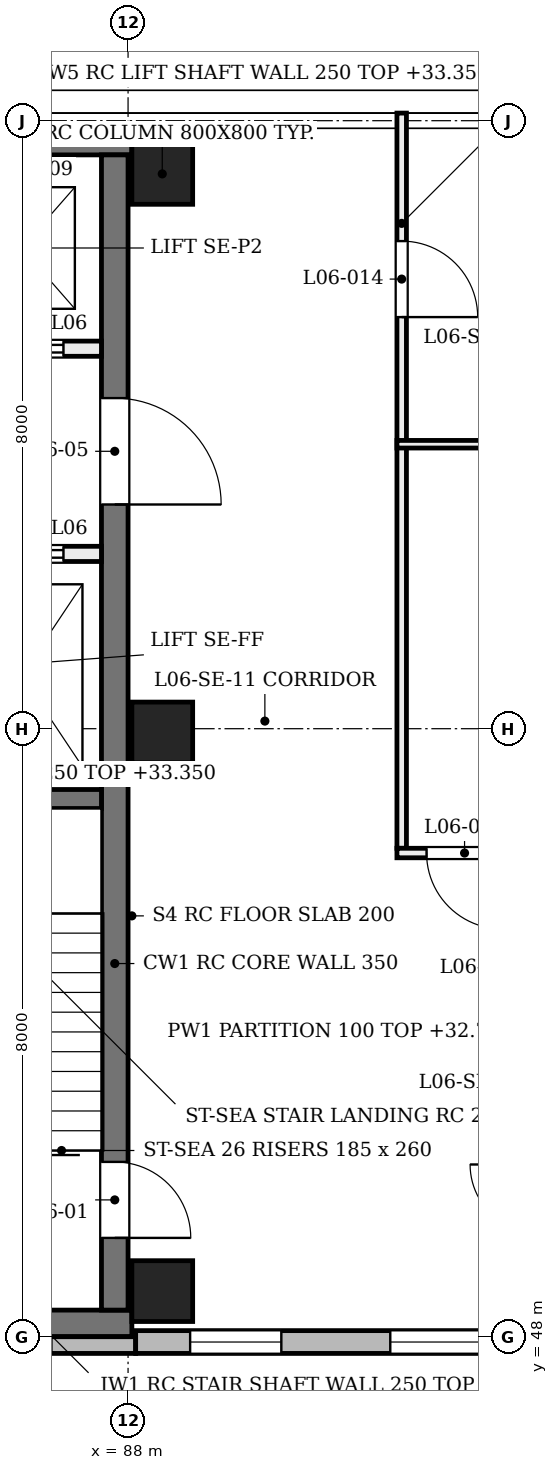
"""IFC4 building model, lengths in metres.
Left out: names, types, materials, properties, quantities, classifications, styles, units other than length and angle.
Written with IfcOpenShell. Run it as: python <this file> out.ifc"""

import sys

from ifc_helpers import new_model, si_unit, direction, frame, frame_2d, origin, origin_2d, place, context, subcontext, project, spatial, rectangle, extrude, element, fill, save


model = new_model("IFC4")
c1 = context("Model", 3, precision=1e-05, world=origin(), true_north=direction((0.0, 1.0)))
c2 = subcontext(c1, "Body", "Model", "MODEL_VIEW")
j1 = project(units=[si_unit("LENGTHUNIT", "METRE"), si_unit("PLANEANGLEUNIT", "RADIAN")], contexts=[c1])
p1 = place(None, origin())
s1 = spatial("IfcSite", under=j1, at=p1, CompositionType="ELEMENT")
p2 = place(p1, origin())
s2 = spatial("IfcBuilding", under=s1, at=p2, CompositionType="ELEMENT")
p3 = place(p2, frame((0.0, 0.0, 28.8)))
s3 = spatial("IfcBuildingStorey", under=s2, at=p3, CompositionType="ELEMENT", Elevation=28.8)
for number, where, z_axis, x_axis in (
    (1, (80.1, 48.175, 0.0), (0.0, 0.0, 1.0), (1.0, 0.0, 0.0)),
    (2, (80.1, 63.725, 0.0), (0.0, 0.0, 1.0), (1.0, 0.0, 0.0)),
):
    element("IfcWall", number, at=place(p3, frame(where, z_axis=z_axis, x_axis=x_axis)), inside=s3, PredefinedType="SHEAR", context=c2, shape_type="SweptSolid", body=[
        extrude(rectangle(XDim=7.95, YDim=0.35, at=frame_2d((3.975, 0.0))), origin(), (0.0, 0.0, 1.0), 4.58),
    ])
p4 = place(p3, frame((87.825, 48.35, 0.0), z_axis=(0.0, 0.0, 1.0), x_axis=(0.0, 1.0, 0.0)))
e3 = element("IfcWall", 3, at=p4, inside=s3, PredefinedType="SHEAR", context=c2, shape_type="SweptSolid", body=[
    extrude(rectangle(XDim=15.2, YDim=0.35, at=frame_2d((7.6, 0.0))), origin(), (0.0, 0.0, 1.0), 4.58),
])
p5 = place(p4, frame((0.95, 0.0, 0.0)))
e4 = element("IfcOpeningElement", 4, at=p5, cuts=e3, PredefinedType="OPENING", context=c2, shape_type="SweptSolid", body=[
    extrude(rectangle(XDim=1.0, YDim=2.1, at=frame_2d((0.5, 1.05))), frame((0.0, 0.185, 0.0), z_axis=(0.0, -1.0, 0.0), x_axis=(1.0, 0.0, 0.0)), (0.0, 0.0, 1.0), 0.37),
])
p6 = place(p4, frame((10.6, 0.0, 0.0)))
e5 = element("IfcOpeningElement", 5, at=p6, cuts=e3, PredefinedType="OPENING", context=c2, shape_type="SweptSolid", body=[
    extrude(rectangle(XDim=1.4, YDim=2.1, at=frame_2d((0.7, 1.05))), frame((0.0, 0.185, 0.0), z_axis=(0.0, -1.0, 0.0), x_axis=(1.0, 0.0, 0.0)), (0.0, 0.0, 1.0), 0.37),
])
for number, where, z_axis, x_axis in (
    (6, (88.45, 48.6, 0.0), (0.0, 0.0, 1.0), (1.0, 0.0, 0.0)),
    (7, (88.45, 55.95, 0.0), (0.0, 0.0, 1.0), (1.0, 0.0, 0.0)),
    (8, (88.45, 63.3, 0.0), (0.0, 0.0, 1.0), (1.0, 0.0, 0.0)),
):
    element("IfcColumn", number, at=place(p3, frame(where, z_axis=z_axis, x_axis=x_axis)), inside=s3, PredefinedType="COLUMN", context=c2, shape_type="SweptSolid", body=[
        extrude(rectangle(XDim=0.8, YDim=0.8, at=origin_2d()), origin(), (0.0, 0.0, 1.0), 4.58),
    ])
p7 = place(p3, frame((79.9, 47.89, 0.0), z_axis=(0.0, 0.0, 1.0), x_axis=(1.0, 0.0, 0.0)))
e9 = element("IfcWall", 9, at=p7, inside=s3, PredefinedType="SOLIDWALL", context=c2, shape_type="SweptSolid", body=[
    extrude(rectangle(XDim=8.2, YDim=0.22, at=frame_2d((4.1, 0.0))), origin(), (0.0, 0.0, 1.0), 3.9),
])
p8 = place(p7, frame((1.308, 0.0, 0.9)))
e10 = element("IfcOpeningElement", 10, at=p8, cuts=e9, PredefinedType="OPENING", context=c2, shape_type="SweptSolid", body=[
    extrude(rectangle(XDim=0.45, YDim=2.6, at=frame_2d((0.225, 1.3))), frame((0.0, 0.12, 0.0), z_axis=(0.0, -1.0, 0.0), x_axis=(1.0, 0.0, 0.0)), (0.0, 0.0, 1.0), 0.24),
])
p9 = place(p7, frame((3.975, 0.0, 0.9)))
e11 = element("IfcOpeningElement", 11, at=p9, cuts=e9, PredefinedType="OPENING", context=c2, shape_type="SweptSolid", body=[
    extrude(rectangle(XDim=0.45, YDim=2.6, at=frame_2d((0.225, 1.3))), frame((0.0, 0.12, 0.0), z_axis=(0.0, -1.0, 0.0), x_axis=(1.0, 0.0, 0.0)), (0.0, 0.0, 1.0), 0.24),
])
p10 = place(p7, frame((6.642, 0.0, 0.9)))
e12 = element("IfcOpeningElement", 12, at=p10, cuts=e9, PredefinedType="OPENING", context=c2, shape_type="SweptSolid", body=[
    extrude(rectangle(XDim=0.45, YDim=2.6, at=frame_2d((0.225, 1.3))), frame((0.0, 0.12, 0.0), z_axis=(0.0, -1.0, 0.0), x_axis=(1.0, 0.0, 0.0)), (0.0, 0.0, 1.0), 0.24),
])
p11 = place(p3, frame((88.1, 47.93, 0.0), z_axis=(0.0, 0.0, 1.0), x_axis=(1.0, 0.0, 0.0)))
e13 = element("IfcWall", 13, at=p11, inside=s3, PredefinedType="SOLIDWALL", context=c2, shape_type="SweptSolid", body=[
    extrude(rectangle(XDim=7.9, YDim=0.3, at=frame_2d((3.95, 0.0))), origin(), (0.0, 0.0, 1.0), 3.9),
])
p12 = place(p11, frame((0.717, 0.0, 1.0)))
e14 = element("IfcOpeningElement", 14, at=p12, cuts=e13, PredefinedType="OPENING", context=c2, shape_type="SweptSolid", body=[
    extrude(rectangle(XDim=1.2, YDim=2.4, at=frame_2d((0.6, 1.2))), frame((0.0, 0.16, 0.0), z_axis=(0.0, -1.0, 0.0), x_axis=(1.0, 0.0, 0.0)), (0.0, 0.0, 1.0), 0.32),
])
p13 = place(p11, frame((3.35, 0.0, 1.0)))
e15 = element("IfcOpeningElement", 15, at=p13, cuts=e13, PredefinedType="OPENING", context=c2, shape_type="SweptSolid", body=[
    extrude(rectangle(XDim=1.2, YDim=2.4, at=frame_2d((0.6, 1.2))), frame((0.0, 0.16, 0.0), z_axis=(0.0, -1.0, 0.0), x_axis=(1.0, 0.0, 0.0)), (0.0, 0.0, 1.0), 0.32),
])
p14 = place(p11, frame((5.983, 0.0, 1.0)))
e16 = element("IfcOpeningElement", 16, at=p14, cuts=e13, PredefinedType="OPENING", context=c2, shape_type="SweptSolid", body=[
    extrude(rectangle(XDim=1.2, YDim=2.4, at=frame_2d((0.6, 1.2))), frame((0.0, 0.16, 0.0), z_axis=(0.0, -1.0, 0.0), x_axis=(1.0, 0.0, 0.0)), (0.0, 0.0, 1.0), 0.32),
])
p15 = place(p3, frame((85.3, 64.25, 0.0), z_axis=(0.0, 0.0, 1.0), x_axis=(1.0, 0.0, 0.0)))
e17 = element("IfcWall", 17, at=p15, inside=s3, PredefinedType="PARAPET", context=c2, shape_type="SweptSolid", body=[
    extrude(rectangle(XDim=15.4, YDim=0.3, at=frame_2d((7.7, 0.0))), origin(), (0.0, 0.0, 1.0), 1.1),
])
p16 = place(p3, frame((87.65, 55.075, 0.0), z_axis=(0.0, 0.0, 1.0), x_axis=(-1.0, 0.0, 0.0)))
e18 = element("IfcWall", 18, at=p16, inside=s3, PredefinedType="SOLIDWALL", context=c2, shape_type="SweptSolid", body=[
    extrude(rectangle(XDim=3.1, YDim=0.25, at=frame_2d((1.55, 0.0))), origin(), (0.0, 0.0, 1.0), 4.55),
])
p17 = place(p3, frame((87.65, 58.3, 0.0), z_axis=(0.0, 0.0, 1.0), x_axis=(-1.0, 0.0, 0.0)))
e19 = element("IfcWall", 19, at=p17, inside=s3, PredefinedType="SOLIDWALL", context=c2, shape_type="SweptSolid", body=[
    extrude(rectangle(XDim=7.2, YDim=0.2, at=frame_2d((3.6, 0.0))), origin(), (0.0, 0.0, 1.0), 4.55),
])
p18 = place(p17, frame((0.5, 0.0, 0.0)))
e20 = element("IfcOpeningElement", 20, at=p18, cuts=e19, PredefinedType="OPENING", context=c2, shape_type="SweptSolid", body=[
    extrude(rectangle(XDim=1.1, YDim=2.1, at=frame_2d((0.55, 1.05))), frame((0.0, 0.11, 0.0), z_axis=(0.0, -1.0, 0.0), x_axis=(1.0, 0.0, 0.0)), (0.0, 0.0, 1.0), 0.22),
])
p19 = place(p17, frame((5.6, 0.0, 0.0)))
e21 = element("IfcOpeningElement", 21, at=p19, cuts=e19, PredefinedType="OPENING", context=c2, shape_type="SweptSolid", body=[
    extrude(rectangle(XDim=1.1, YDim=2.1, at=frame_2d((0.55, 1.05))), frame((0.0, 0.11, 0.0), z_axis=(0.0, -1.0, 0.0), x_axis=(1.0, 0.0, 0.0)), (0.0, 0.0, 1.0), 0.22),
])
p20 = place(p17, frame((3.1, 0.0, 0.0)))
e22 = element("IfcOpeningElement", 22, at=p20, cuts=e19, PredefinedType="OPENING", context=c2, shape_type="SweptSolid", body=[
    extrude(rectangle(XDim=1.0, YDim=2.1, at=frame_2d((0.5, 1.05))), frame((0.0, 0.11, 0.0), z_axis=(0.0, -1.0, 0.0), x_axis=(1.0, 0.0, 0.0)), (0.0, 0.0, 1.0), 0.22),
])
p21 = place(p3, frame((87.65, 61.0, 0.0), z_axis=(0.0, 0.0, 1.0), x_axis=(-1.0, 0.0, 0.0)))
e23 = element("IfcWall", 23, at=p21, inside=s3, PredefinedType="SOLIDWALL", context=c2, shape_type="SweptSolid", body=[
    extrude(rectangle(XDim=7.2, YDim=0.2, at=frame_2d((3.6, 0.0))), origin(), (0.0, 0.0, 1.0), 4.55),
])
p22 = place(p21, frame((0.5, 0.0, 0.0)))
e24 = element("IfcOpeningElement", 24, at=p22, cuts=e23, PredefinedType="OPENING", context=c2, shape_type="SweptSolid", body=[
    extrude(rectangle(XDim=1.1, YDim=2.1, at=frame_2d((0.55, 1.05))), frame((0.0, 0.11, 0.0), z_axis=(0.0, -1.0, 0.0), x_axis=(1.0, 0.0, 0.0)), (0.0, 0.0, 1.0), 0.22),
])
p23 = place(p21, frame((5.6, 0.0, 0.0)))
e25 = element("IfcOpeningElement", 25, at=p23, cuts=e23, PredefinedType="OPENING", context=c2, shape_type="SweptSolid", body=[
    extrude(rectangle(XDim=1.1, YDim=2.1, at=frame_2d((0.55, 1.05))), frame((0.0, 0.11, 0.0), z_axis=(0.0, -1.0, 0.0), x_axis=(1.0, 0.0, 0.0)), (0.0, 0.0, 1.0), 0.22),
])
p24 = place(p21, frame((3.1, 0.0, 0.0)))
e26 = element("IfcOpeningElement", 26, at=p24, cuts=e23, PredefinedType="OPENING", context=c2, shape_type="SweptSolid", body=[
    extrude(rectangle(XDim=1.0, YDim=2.1, at=frame_2d((0.5, 1.05))), frame((0.0, 0.11, 0.0), z_axis=(0.0, -1.0, 0.0), x_axis=(1.0, 0.0, 0.0)), (0.0, 0.0, 1.0), 0.22),
])
p25 = place(p3, frame((91.6, 54.427, 0.0), z_axis=(0.0, 0.0, 1.0), x_axis=(0.0, 1.0, 0.0)))
e27 = element("IfcWall", 27, at=p25, inside=s3, PredefinedType="PARTITIONING", context=c2, shape_type="SweptSolid", body=[
    extrude(rectangle(XDim=9.674, YDim=0.125, at=frame_2d((4.837, 0.0))), origin(), (0.0, 0.0, 1.0), 3.88),
])
p26 = place(p25, frame((6.99, 0.0, 0.0)))
e28 = element("IfcOpeningElement", 28, at=p26, cuts=e27, PredefinedType="OPENING", context=c2, shape_type="SweptSolid", body=[
    extrude(rectangle(XDim=1.0, YDim=2.1, at=frame_2d((0.5, 1.05))), frame((0.0, 0.073, 0.0), z_axis=(0.0, -1.0, 0.0), x_axis=(1.0, 0.0, 0.0)), (0.0, 0.0, 1.0), 0.145),
])
p27 = place(p3, frame((91.538, 54.364, 0.0), z_axis=(0.0, 0.0, 1.0), x_axis=(1.0, 0.0, 0.0)))
e29 = element("IfcWall", 29, at=p27, inside=s3, PredefinedType="PARTITIONING", context=c2, shape_type="SweptSolid", body=[
    extrude(rectangle(XDim=1.925, YDim=0.125, at=frame_2d((0.962, 0.0))), origin(), (0.0, 0.0, 1.0), 4.56),
])
p28 = place(p27, frame((0.39, 0.0, 0.0)))
e30 = element("IfcOpeningElement", 30, at=p28, cuts=e29, PredefinedType="OPENING", context=c2, shape_type="SweptSolid", body=[
    extrude(rectangle(XDim=1.0, YDim=2.1, at=frame_2d((0.5, 1.05))), frame((0.0, 0.073, 0.0), z_axis=(0.0, -1.0, 0.0), x_axis=(1.0, 0.0, 0.0)), (0.0, 0.0, 1.0), 0.145),
])
p29 = place(p3, frame((91.538, 59.743, 0.0), z_axis=(0.0, 0.0, 1.0), x_axis=(1.0, 0.0, 0.0)))
e31 = element("IfcWall", 31, at=p29, inside=s3, PredefinedType="PARTITIONING", context=c2, shape_type="SweptSolid", body=[
    extrude(rectangle(XDim=4.162, YDim=0.1, at=frame_2d((2.081, 0.0))), origin(), (0.0, 0.0, 1.0), 3.98),
])
p30 = place(p12, origin())
e32 = element("IfcWindow", 32, at=p30, inside=s3, PartitioningType="SINGLE_PANEL", PredefinedType="WINDOW", context=c2, shape_type="SweptSolid", body=[
    extrude(rectangle(XDim=1.2, YDim=2.4, at=frame_2d((0.6, 1.2))), frame((0.0, 0.03, 0.0), z_axis=(0.0, -1.0, 0.0), x_axis=(1.0, 0.0, 0.0)), (0.0, 0.0, 1.0), 0.06),
])
fill(e14, e32)
p31 = place(p13, origin())
e33 = element("IfcWindow", 33, at=p31, inside=s3, PartitioningType="SINGLE_PANEL", PredefinedType="WINDOW", context=c2, shape_type="SweptSolid", body=[
    extrude(rectangle(XDim=1.2, YDim=2.4, at=frame_2d((0.6, 1.2))), frame((0.0, 0.03, 0.0), z_axis=(0.0, -1.0, 0.0), x_axis=(1.0, 0.0, 0.0)), (0.0, 0.0, 1.0), 0.06),
])
fill(e15, e33)
p32 = place(p5, frame((1.0, 0.0, 0.0), z_axis=(0.0, 0.0, 1.0), x_axis=(-1.0, 0.0, 0.0)))
e34 = element("IfcDoor", 34, at=p32, inside=s3, OperationType="SINGLE_SWING_LEFT", PredefinedType="DOOR", context=c2, shape_type="SweptSolid", body=[
    extrude(rectangle(XDim=1.0, YDim=2.1, at=frame_2d((0.5, 1.05))), frame((0.0, 0.025, 0.0), z_axis=(0.0, -1.0, 0.0), x_axis=(1.0, 0.0, 0.0)), (0.0, 0.0, 1.0), 0.05),
])
fill(e4, e34)
p33 = place(p18, frame((1.1, 0.0, 0.0), z_axis=(0.0, 0.0, 1.0), x_axis=(-1.0, 0.0, 0.0)))
e35 = element("IfcDoor", 35, at=p33, inside=s3, OperationType="DOUBLE_DOOR_SLIDING", PredefinedType="DOOR", context=c2, shape_type="SweptSolid", body=[
    extrude(rectangle(XDim=1.1, YDim=2.1, at=frame_2d((0.55, 1.05))), frame((0.0, 0.025, 0.0), z_axis=(0.0, -1.0, 0.0), x_axis=(1.0, 0.0, 0.0)), (0.0, 0.0, 1.0), 0.05),
])
fill(e20, e35)
p34 = place(p22, origin())
e36 = element("IfcDoor", 36, at=p34, inside=s3, OperationType="DOUBLE_DOOR_SLIDING", PredefinedType="DOOR", context=c2, shape_type="SweptSolid", body=[
    extrude(rectangle(XDim=1.1, YDim=2.1, at=frame_2d((0.55, 1.05))), frame((0.0, 0.025, 0.0), z_axis=(0.0, -1.0, 0.0), x_axis=(1.0, 0.0, 0.0)), (0.0, 0.0, 1.0), 0.05),
])
fill(e24, e36)
p35 = place(p6, frame((1.4, 0.0, 0.0), z_axis=(0.0, 0.0, 1.0), x_axis=(-1.0, 0.0, 0.0)))
e37 = element("IfcDoor", 37, at=p35, inside=s3, OperationType="SINGLE_SWING_LEFT", PredefinedType="DOOR", context=c2, shape_type="SweptSolid", body=[
    extrude(rectangle(XDim=1.4, YDim=2.1, at=frame_2d((0.7, 1.05))), frame((0.0, 0.025, 0.0), z_axis=(0.0, -1.0, 0.0), x_axis=(1.0, 0.0, 0.0)), (0.0, 0.0, 1.0), 0.05),
])
fill(e5, e37)
p36 = place(p28, origin())
e38 = element("IfcDoor", 38, at=p36, inside=s3, OperationType="SINGLE_SWING_RIGHT", PredefinedType="DOOR", context=c2, shape_type="SweptSolid", body=[
    extrude(rectangle(XDim=1.0, YDim=2.1, at=frame_2d((0.5, 1.05))), frame((0.0, 0.025, 0.0), z_axis=(0.0, -1.0, 0.0), x_axis=(1.0, 0.0, 0.0)), (0.0, 0.0, 1.0), 0.05),
])
fill(e30, e38)
p37 = place(p26, frame((1.0, 0.0, 0.0), z_axis=(0.0, 0.0, 1.0), x_axis=(-1.0, 0.0, 0.0)))
e39 = element("IfcDoor", 39, at=p37, inside=s3, OperationType="SINGLE_SWING_LEFT", PredefinedType="DOOR", context=c2, shape_type="SweptSolid", body=[
    extrude(rectangle(XDim=1.0, YDim=2.1, at=frame_2d((0.5, 1.05))), frame((0.0, 0.025, 0.0), z_axis=(0.0, -1.0, 0.0), x_axis=(1.0, 0.0, 0.0)), (0.0, 0.0, 1.0), 0.05),
])
fill(e28, e39)
save(model, sys.argv[1])
